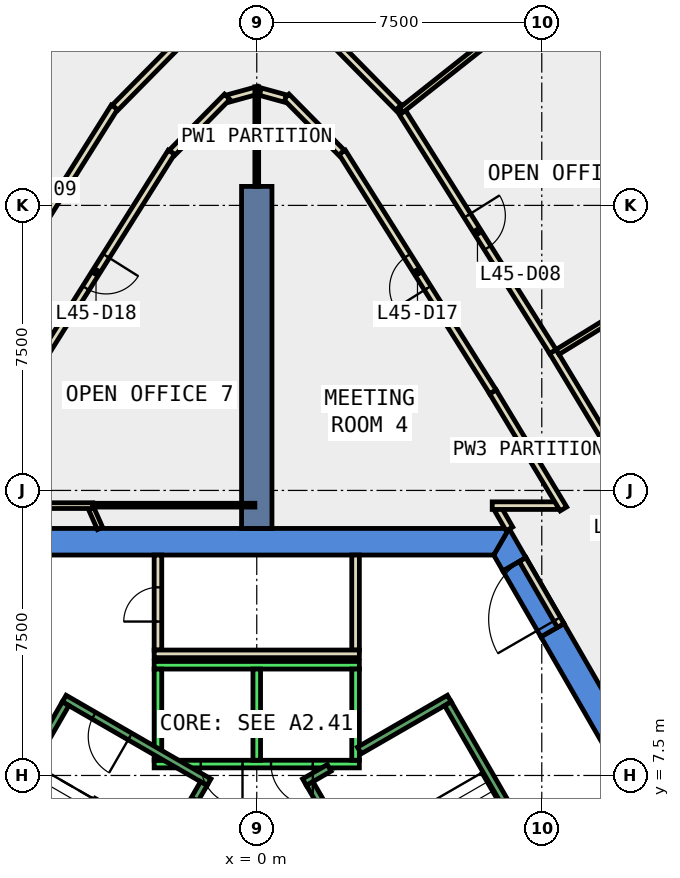
"""IFC4 building model, lengths in metres.
Left out: names, types, materials, properties, quantities, classifications, styles, units other than length and angle.
Written with IfcOpenShell. Run it as: python <this file> out.ifc"""

import sys

from ifc_helpers import new_model, si_unit, direction, frame, frame_2d, origin, place, context, subcontext, project, spatial, polyline, rectangle, outline, extrude, element, fill, save


model = new_model("IFC4")
c1 = context("Model", 3, precision=1e-05, world=origin(), true_north=direction((0.0, 1.0)))
c2 = subcontext(c1, "Body", "Model", "MODEL_VIEW")
j1 = project(units=[si_unit("LENGTHUNIT", "METRE"), si_unit("PLANEANGLEUNIT", "RADIAN")], contexts=[c1])
p1 = place(None, origin())
s1 = spatial("IfcSite", under=j1, at=p1, CompositionType="ELEMENT")
p2 = place(p1, origin())
s2 = spatial("IfcBuilding", under=s1, at=p2, CompositionType="ELEMENT")
p3 = place(p2, frame((0.0, 0.0, 202.4)))
s3 = spatial("IfcBuildingStorey", under=s2, at=p3, CompositionType="ELEMENT", Elevation=202.4)
p4 = place(p3, frame((0.0, 0.0, -0.4)))
e1 = element("IfcWall", 1, at=p4, inside=s3, PredefinedType="SHEAR", context=c2, shape_type="SweptSolid", body=[
    extrude(outline(polyline([(8.084, 11.498), (7.478, 11.148), (12.471, 2.5), (13.279, 2.5), (8.084, 11.498)])), origin(), (0.0, 0.0, 1.0), 4.2),
])
p5 = place(p3, frame((0.0, 0.0, -0.4)))
e2 = element("IfcWall", 2, at=p5, inside=s3, PredefinedType="SHEAR", context=c2, shape_type="SweptSolid", body=[
    extrude(outline(polyline([(6.478, 12.88), (7.084, 13.23), (6.64, 14.0), (6.235, 13.3), (6.478, 12.88)])), origin(), (0.0, 0.0, 1.0), 4.2),
])
p6 = place(p3, frame((0.0, 0.0, 3.6)))
e3 = element("IfcWall", 3, at=p6, inside=s3, PredefinedType="SHEAR", context=c2, shape_type="SweptSolid", body=[
    extrude(outline(polyline([(7.084, 13.23), (6.478, 12.88), (7.478, 11.148), (8.084, 11.498), (7.084, 13.23)])), origin(), (0.0, 0.0, 1.0), 0.2),
])
p7 = place(p3, frame((0.0, 0.0, -0.4)))
e4 = element("IfcWall", 4, at=p7, inside=s3, PredefinedType="SHEAR", context=c2, shape_type="SweptSolid", body=[
    extrude(outline(polyline([(6.64, 14.0), (-6.64, 14.0), (-6.235, 13.3), (6.235, 13.3), (6.64, 14.0)])), origin(), (0.0, 0.0, 1.0), 4.2),
])
p8 = place(p3, frame((0.0, 14.0, -0.4), z_axis=(0.0, 0.0, 1.0), x_axis=(0.0, 1.0, 0.0)))
e5 = element("IfcWall", 5, at=p8, inside=s3, PredefinedType="SHEAR", context=c2, shape_type="SweptSolid", body=[
    extrude(rectangle(XDim=9.0, YDim=0.8, at=frame_2d((4.5, 0.0))), origin(), (0.0, 0.0, 1.0), 4.2),
])
p9 = place(p3, frame((12.632, 22.134, 0.0), z_axis=(0.0, 0.0, 1.0), x_axis=(-0.532522107002, 0.84641609481, 0.0)))
e6 = element("IfcWall", 6, at=p9, inside=s3, PredefinedType="STANDARD", context=c2, shape_type="SweptSolid", body=[
    extrude(rectangle(XDim=7.273, YDim=0.3, at=frame_2d((3.636, 0.0))), origin(), (0.0, 0.0, 1.0), 3.8),
])
p10 = place(p9, frame((0.618, 0.0, 0.9)))
e7 = element("IfcOpeningElement", 7, at=p10, cuts=e6, PredefinedType="OPENING", context=c2, shape_type="SweptSolid", body=[
    extrude(rectangle(XDim=2.4, YDim=2.6, at=frame_2d((1.2, 1.3))), frame((0.0, 0.16, 0.0), z_axis=(0.0, -1.0, 0.0), x_axis=(1.0, 0.0, 0.0)), (0.0, 0.0, 1.0), 0.32),
])
p11 = place(p9, frame((4.255, 0.0, 0.9)))
e8 = element("IfcOpeningElement", 8, at=p11, cuts=e6, PredefinedType="OPENING", context=c2, shape_type="SweptSolid", body=[
    extrude(rectangle(XDim=2.4, YDim=2.6, at=frame_2d((1.2, 1.3))), frame((0.0, 0.16, 0.0), z_axis=(0.0, -1.0, 0.0), x_axis=(1.0, 0.0, 0.0)), (0.0, 0.0, 1.0), 0.32),
])
p12 = place(p3, frame((6.649, 13.988, 0.0), z_axis=(0.0, 0.0, 1.0), x_axis=(-0.499908430952, 0.866078264744, 0.0)))
e9 = element("IfcWall", 9, at=p12, inside=s3, PredefinedType="PARTITIONING", context=c2, shape_type="SweptSolid", body=[
    extrude(rectangle(XDim=0.606, YDim=0.2, at=frame_2d((0.303, 0.0))), origin(), (0.0, 0.0, 1.0), 3.8),
])
p13 = place(p3, frame((6.196, 14.6, 0.0), z_axis=(0.0, 0.0, 1.0), x_axis=(1.0, 0.0, 0.0)))
e10 = element("IfcWall", 10, at=p13, inside=s3, PredefinedType="PARTITIONING", context=c2, shape_type="SweptSolid", body=[
    extrude(rectangle(XDim=1.722, YDim=0.2, at=frame_2d((0.861, 0.0))), origin(), (0.0, 0.0, 1.0), 3.8),
])
p14 = place(p3, frame((8.07, 14.514, 0.0), z_axis=(0.0, 0.0, 1.0), x_axis=(-0.51624118739, 0.856443247648, 0.0)))
e11 = element("IfcWall", 11, at=p14, inside=s3, PredefinedType="PARTITIONING", context=c2, shape_type="SweptSolid", body=[
    extrude(rectangle(XDim=3.597, YDim=0.2, at=frame_2d((1.799, 0.0))), origin(), (0.0, 0.0, 1.0), 3.8),
])
p15 = place(p3, frame((6.213, 17.595, 0.0), z_axis=(0.0, 0.0, 1.0), x_axis=(-0.532527247309, 0.846412860768, 0.0)))
e12 = element("IfcWall", 12, at=p15, inside=s3, PredefinedType="PARTITIONING", context=c2, shape_type="SweptSolid", body=[
    extrude(rectangle(XDim=7.449, YDim=0.2, at=frame_2d((3.725, 0.0))), origin(), (0.0, 0.0, 1.0), 3.8),
])
p16 = place(p15, frame((3.225, 0.0, 0.0)))
e13 = element("IfcOpeningElement", 13, at=p16, cuts=e12, PredefinedType="OPENING", context=c2, shape_type="SweptSolid", body=[
    extrude(rectangle(XDim=1.0, YDim=2.1, at=frame_2d((0.5, 1.05))), frame((0.0, 0.11, 0.0), z_axis=(0.0, -1.0, 0.0), x_axis=(1.0, 0.0, 0.0)), (0.0, 0.0, 1.0), 0.22),
])
p17 = place(p3, frame((2.229, 23.887, 0.0), z_axis=(0.0, 0.0, 1.0), x_axis=(-0.702245482258, 0.711934886523, 0.0)))
e14 = element("IfcWall", 14, at=p17, inside=s3, PredefinedType="PARTITIONING", context=c2, shape_type="SweptSolid", body=[
    extrude(rectangle(XDim=2.066, YDim=0.2, at=frame_2d((1.033, 0.0))), origin(), (0.0, 0.0, 1.0), 3.8),
])
p18 = place(p3, frame((0.752, 25.313, 0.0), z_axis=(0.0, 0.0, 1.0), x_axis=(-0.964381816756, 0.264514104559, 0.0)))
e15 = element("IfcWall", 15, at=p18, inside=s3, PredefinedType="PARTITIONING", context=c2, shape_type="SweptSolid", body=[
    extrude(rectangle(XDim=0.68, YDim=0.2, at=frame_2d((0.34, 0.0))), origin(), (0.0, 0.0, 1.0), 3.8),
])
p19 = place(p3, frame((0.048, 25.533, 0.0), z_axis=(0.0, 0.0, 1.0), x_axis=(-0.964218556253, -0.265108611286, 0.0)))
e16 = element("IfcWall", 16, at=p19, inside=s3, PredefinedType="PARTITIONING", context=c2, shape_type="SweptSolid", body=[
    extrude(rectangle(XDim=0.83, YDim=0.2, at=frame_2d((0.415, 0.0))), origin(), (0.0, 0.0, 1.0), 3.8),
])
p20 = place(p3, frame((-0.778, 25.358, 0.0), z_axis=(0.0, 0.0, 1.0), x_axis=(-0.702245482258, -0.711934886523, 0.0)))
e17 = element("IfcWall", 17, at=p20, inside=s3, PredefinedType="PARTITIONING", context=c2, shape_type="SweptSolid", body=[
    extrude(rectangle(XDim=2.066, YDim=0.2, at=frame_2d((1.033, 0.0))), origin(), (0.0, 0.0, 1.0), 3.8),
])
p21 = place(p3, frame((-2.246, 23.9, 0.0), z_axis=(0.0, 0.0, 1.0), x_axis=(-0.532527247309, -0.846412860768, 0.0)))
e18 = element("IfcWall", 18, at=p21, inside=s3, PredefinedType="PARTITIONING", context=c2, shape_type="SweptSolid", body=[
    extrude(rectangle(XDim=7.449, YDim=0.2, at=frame_2d((3.725, 0.0))), origin(), (0.0, 0.0, 1.0), 3.8),
])
p22 = place(p21, frame((3.225, 0.0, 0.0)))
e19 = element("IfcOpeningElement", 19, at=p22, cuts=e18, PredefinedType="OPENING", context=c2, shape_type="SweptSolid", body=[
    extrude(rectangle(XDim=1.0, YDim=2.1, at=frame_2d((0.5, 1.05))), frame((0.0, 0.11, 0.0), z_axis=(0.0, -1.0, 0.0), x_axis=(1.0, 0.0, 0.0)), (0.0, 0.0, 1.0), 0.22),
])
p23 = place(p3, frame((7.792, 18.655, 0.0), z_axis=(0.0, 0.0, 1.0), x_axis=(0.516293428925, -0.856411755669, 0.0)))
e20 = element("IfcWall", 20, at=p23, inside=s3, PredefinedType="PARTITIONING", context=c2, shape_type="SweptSolid", body=[
    extrude(rectangle(XDim=8.124, YDim=0.2, at=frame_2d((4.062, 0.0))), origin(), (0.0, 0.0, 1.0), 3.8),
])
p24 = place(p23, frame((3.637, 0.0, 0.0)))
e21 = element("IfcOpeningElement", 21, at=p24, cuts=e20, PredefinedType="OPENING", context=c2, shape_type="SweptSolid", body=[
    extrude(rectangle(XDim=1.0, YDim=2.1, at=frame_2d((0.5, 1.05))), frame((0.0, 0.11, 0.0), z_axis=(0.0, -1.0, 0.0), x_axis=(1.0, 0.0, 0.0)), (0.0, 0.0, 1.0), 0.22),
])
p25 = place(p3, frame((3.744, 25.087, 0.0), z_axis=(0.0, 0.0, 1.0), x_axis=(0.532569549341, -0.846386244639, 0.0)))
e22 = element("IfcWall", 22, at=p25, inside=s3, PredefinedType="PARTITIONING", context=c2, shape_type="SweptSolid", body=[
    extrude(rectangle(XDim=7.599, YDim=0.2, at=frame_2d((3.8, 0.0))), origin(), (0.0, 0.0, 1.0), 3.8),
])
p26 = place(p25, frame((3.375, 0.0, 0.0)))
e23 = element("IfcOpeningElement", 23, at=p26, cuts=e22, PredefinedType="OPENING", context=c2, shape_type="SweptSolid", body=[
    extrude(rectangle(XDim=1.0, YDim=2.1, at=frame_2d((0.5, 1.05))), frame((0.0, 0.11, 0.0), z_axis=(0.0, -1.0, 0.0), x_axis=(1.0, 0.0, 0.0)), (0.0, 0.0, 1.0), 0.22),
])
p27 = place(p3, frame((-7.871, 18.528, 0.0), z_axis=(0.0, 0.0, 1.0), x_axis=(0.532587642146, 0.846374859878, 0.0)))
e24 = element("IfcWall", 24, at=p27, inside=s3, PredefinedType="PARTITIONING", context=c2, shape_type="SweptSolid", body=[
    extrude(rectangle(XDim=7.749, YDim=0.2, at=frame_2d((3.875, 0.0))), origin(), (0.0, 0.0, 1.0), 3.8),
])
p28 = place(p27, frame((3.375, 0.0, 0.0)))
e25 = element("IfcOpeningElement", 25, at=p28, cuts=e24, PredefinedType="OPENING", context=c2, shape_type="SweptSolid", body=[
    extrude(rectangle(XDim=1.0, YDim=2.1, at=frame_2d((0.5, 1.05))), frame((0.0, 0.11, 0.0), z_axis=(0.0, -1.0, 0.0), x_axis=(1.0, 0.0, 0.0)), (0.0, 0.0, 1.0), 0.22),
])
for number, where, z_axis, x_axis in (
    (26, (-3.727, 25.074, 0.0), (0.0, 0.0, 1.0), (0.702, 0.712, 0.0)),
    (27, (1.773, 27.056, 0.0), (0.0, 0.0, 1.0), (0.702, -0.712, 0.0)),
):
    element("IfcWall", number, at=place(p3, frame(where, z_axis=z_axis, x_axis=x_axis)), inside=s3, PredefinedType="PARTITIONING", context=c2, shape_type="SweptSolid", body=[
        extrude(rectangle(XDim=2.783, YDim=0.2, at=frame_2d((1.392, 0.0))), origin(), (0.0, 0.0, 1.0), 3.8),
    ])
p29 = place(p3, frame((-2.6, 10.8, 0.0), z_axis=(0.0, 0.0, 1.0), x_axis=(0.0, 1.0, 0.0)))
e28 = element("IfcWall", 28, at=p29, inside=s3, PredefinedType="PARTITIONING", context=c2, shape_type="SweptSolid", body=[
    extrude(rectangle(XDim=2.5, YDim=0.2, at=frame_2d((1.25, 0.0))), origin(), (0.0, 0.0, 1.0), 3.8),
])
p30 = place(p29, frame((0.75, 0.0, 0.0)))
e29 = element("IfcOpeningElement", 29, at=p30, cuts=e28, PredefinedType="OPENING", context=c2, shape_type="SweptSolid", body=[
    extrude(rectangle(XDim=0.9, YDim=2.1, at=frame_2d((0.45, 1.05))), frame((0.0, 0.11, 0.0), z_axis=(0.0, -1.0, 0.0), x_axis=(1.0, 0.0, 0.0)), (0.0, 0.0, 1.0), 0.22),
])
p31 = place(p3, frame((2.6, 13.3, 0.0), z_axis=(0.0, 0.0, 1.0), x_axis=(0.0, -1.0, 0.0)))
e30 = element("IfcWall", 30, at=p31, inside=s3, PredefinedType="PARTITIONING", context=c2, shape_type="SweptSolid", body=[
    extrude(rectangle(XDim=2.5, YDim=0.2, at=frame_2d((1.25, 0.0))), origin(), (0.0, 0.0, 1.0), 3.8),
])
p32 = place(p3, frame((2.7, 10.7, 0.0), z_axis=(0.0, 0.0, 1.0), x_axis=(-1.0, 0.0, 0.0)))
e31 = element("IfcWall", 31, at=p32, inside=s3, PredefinedType="PARTITIONING", context=c2, shape_type="SweptSolid", body=[
    extrude(rectangle(XDim=5.4, YDim=0.2, at=frame_2d((2.7, 0.0))), origin(), (0.0, 0.0, 1.0), 3.8),
])
p33 = place(p3, frame((-4.125, 14.0, 0.0), z_axis=(0.0, 0.0, 1.0), x_axis=(-0.404850841056, 0.914382740703, 0.0)))
e32 = element("IfcWall", 32, at=p33, inside=s3, PredefinedType="PARTITIONING", context=c2, shape_type="SweptSolid", body=[
    extrude(rectangle(XDim=0.581, YDim=0.15, at=frame_2d((0.291, 0.0))), origin(), (0.0, 0.0, 1.0), 3.8),
])
p34 = place(p3, frame((-4.316, 14.6, 0.0), z_axis=(0.0, 0.0, 1.0), x_axis=(-1.0, 0.0, 0.0)))
e33 = element("IfcWall", 33, at=p34, inside=s3, PredefinedType="PARTITIONING", context=c2, shape_type="SweptSolid", body=[
    extrude(rectangle(XDim=3.802, YDim=0.15, at=frame_2d((1.901, 0.0))), origin(), (0.0, 0.0, 1.0), 3.8),
])
p35 = place(p3, frame((-4.316, 14.612, 0.0), z_axis=(0.0, 0.0, 1.0), x_axis=(1.0, 0.0, 0.0)))
e34 = element("IfcWall", 34, at=p35, inside=s3, PredefinedType="PARTITIONING", context=c2, shape_type="SweptSolid", body=[
    extrude(rectangle(XDim=4.266, YDim=0.1, at=frame_2d((2.133, 0.0))), origin(), (0.0, 0.0, 1.0), 3.8),
])
p36 = place(p3, frame((0.0, 23.0, 0.0), z_axis=(0.0, 0.0, 1.0), x_axis=(0.0, 1.0, 0.0)))
e35 = element("IfcWall", 35, at=p36, inside=s3, PredefinedType="PARTITIONING", context=c2, shape_type="SweptSolid", body=[
    extrude(rectangle(XDim=2.62, YDim=0.1, at=frame_2d((1.31, 0.0))), origin(), (0.0, 0.0, 1.0), 3.8),
])
p37 = place(p3, frame((7.916, 18.644, 0.0), z_axis=(0.0, 0.0, 1.0), x_axis=(0.851543444049, 0.524284047914, 0.0)))
e36 = element("IfcWall", 36, at=p37, inside=s3, PredefinedType="PARTITIONING", context=c2, shape_type="SweptSolid", body=[
    extrude(rectangle(XDim=4.379, YDim=0.15, at=frame_2d((2.189, 0.0))), origin(), (0.0, 0.0, 1.0), 3.8),
])
p38 = place(p3, frame((3.797, 25.003, 0.0), z_axis=(0.0, 0.0, 1.0), x_axis=(0.783893371826, 0.620895467536, 0.0)))
e37 = element("IfcWall", 37, at=p38, inside=s3, PredefinedType="PARTITIONING", context=c2, shape_type="SweptSolid", body=[
    extrude(rectangle(XDim=4.514, YDim=0.15, at=frame_2d((2.257, 0.0))), origin(), (0.0, 0.0, 1.0), 3.8),
])
p39 = place(p3, frame((7.997, 11.448, 0.0), z_axis=(0.0, 0.0, 1.0), x_axis=(-0.50002537861, 0.866010750942, 0.0)))
e38 = element("IfcWall", 38, at=p39, inside=s3, PredefinedType="PARTITIONING", context=c2, shape_type="SweptSolid", body=[
    extrude(rectangle(XDim=2.0, YDim=0.2, at=frame_2d((1.0, 0.0))), origin(), (0.0, 0.0, 1.0), 2.4),
])
p40 = place(p39, frame((0.19, 0.0, 0.0)))
e39 = element("IfcOpeningElement", 39, at=p40, cuts=e38, PredefinedType="OPENING", context=c2, shape_type="SweptSolid", body=[
    extrude(rectangle(XDim=1.8, YDim=2.1, at=frame_2d((0.9, 1.05))), frame((0.0, 0.11, 0.0), z_axis=(0.0, -1.0, 0.0), x_axis=(1.0, 0.0, 0.0)), (0.0, 0.0, 1.0), 0.22),
])
p41 = place(p3, frame((2.7, 7.8, 0.0), z_axis=(0.0, 0.0, 1.0), x_axis=(-1.0, 0.0, 0.0)))
e40 = element("IfcWall", 40, at=p41, inside=s3, PredefinedType="STANDARD", context=c2, shape_type="SweptSolid", body=[
    extrude(rectangle(XDim=5.4, YDim=0.2, at=frame_2d((2.7, 0.0))), origin(), (0.0, 0.0, 1.0), 3.8),
])
p42 = place(p41, frame((1.225, 0.0, 0.0)))
e41 = element("IfcOpeningElement", 41, at=p42, cuts=e40, PredefinedType="OPENING", context=c2, shape_type="SweptSolid", body=[
    extrude(rectangle(XDim=1.1, YDim=2.1, at=frame_2d((0.55, 1.05))), frame((0.0, 0.11, 0.0), z_axis=(0.0, -1.0, 0.0), x_axis=(1.0, 0.0, 0.0)), (0.0, 0.0, 1.0), 0.22),
])
p43 = place(p41, frame((3.075, 0.0, 0.0)))
e42 = element("IfcOpeningElement", 42, at=p43, cuts=e40, PredefinedType="OPENING", context=c2, shape_type="SweptSolid", body=[
    extrude(rectangle(XDim=1.1, YDim=2.1, at=frame_2d((0.55, 1.05))), frame((0.0, 0.11, 0.0), z_axis=(0.0, -1.0, 0.0), x_axis=(1.0, 0.0, 0.0)), (0.0, 0.0, 1.0), 0.22),
])
p44 = place(p3, frame((2.7, 10.4, 0.0), z_axis=(0.0, 0.0, 1.0), x_axis=(-1.0, 0.0, 0.0)))
e43 = element("IfcWall", 43, at=p44, inside=s3, PredefinedType="STANDARD", context=c2, shape_type="SweptSolid", body=[
    extrude(rectangle(XDim=5.4, YDim=0.2, at=frame_2d((2.7, 0.0))), origin(), (0.0, 0.0, 1.0), 3.8),
])
for number, where, z_axis, x_axis in (
    (44, (2.6, 7.9, 0.0), (0.0, 0.0, 1.0), (0.0, 1.0, 0.0)),
    (45, (0.0, 7.9, 0.0), (0.0, 0.0, 1.0), (0.0, 1.0, 0.0)),
    (46, (-2.6, 7.9, 0.0), (0.0, 0.0, 1.0), (0.0, 1.0, 0.0)),
):
    element("IfcWall", number, at=place(p3, frame(where, z_axis=z_axis, x_axis=x_axis)), inside=s3, PredefinedType="STANDARD", context=c2, shape_type="SweptSolid", body=[
        extrude(rectangle(XDim=2.4, YDim=0.2, at=frame_2d((1.2, 0.0))), origin(), (0.0, 0.0, 1.0), 3.8),
    ])
p45 = place(p3, frame((2.7, 8.158, 0.0), z_axis=(0.0, 0.0, 1.0), x_axis=(0.86611865017, 0.499838457731, 0.0)))
e47 = element("IfcWall", 47, at=p45, inside=s3, PredefinedType="STANDARD", context=c2, shape_type="SweptSolid", body=[
    extrude(rectangle(XDim=2.733, YDim=0.2, at=frame_2d((1.366, 0.0))), origin(), (0.0, 0.0, 1.0), 3.8),
])
p46 = place(p3, frame((1.256, 7.324, 0.0), z_axis=(0.0, 0.0, 1.0), x_axis=(0.865915093549, 0.500191014278, 0.0)))
e48 = element("IfcWall", 48, at=p46, inside=s3, PredefinedType="STANDARD", context=c2, shape_type="SweptSolid", body=[
    extrude(rectangle(XDim=0.752, YDim=0.2, at=frame_2d((0.376, 0.0))), origin(), (0.0, 0.0, 1.0), 3.8),
])
p47 = place(p3, frame((4.843, 1.312, 0.0), z_axis=(0.0, 0.0, 1.0), x_axis=(-0.499963383562, 0.866046543262, 0.0)))
e49 = element("IfcWall", 49, at=p47, inside=s3, PredefinedType="STANDARD", context=c2, shape_type="SweptSolid", body=[
    extrude(rectangle(XDim=6.9, YDim=0.2, at=frame_2d((3.45, 0.0))), origin(), (0.0, 0.0, 1.0), 3.8),
])
p48 = place(p47, frame((0.45, 0.0, 0.0)))
e50 = element("IfcOpeningElement", 50, at=p48, cuts=e49, PredefinedType="OPENING", context=c2, shape_type="SweptSolid", body=[
    extrude(rectangle(XDim=1.1, YDim=2.2, at=frame_2d((0.55, 1.1))), frame((0.0, 0.11, 0.0), z_axis=(0.0, -1.0, 0.0), x_axis=(1.0, 0.0, 0.0)), (0.0, 0.0, 1.0), 0.22),
])
p49 = place(p3, frame((8.48, 3.412, 0.0), z_axis=(0.0, 0.0, 1.0), x_axis=(-0.499978703459, 0.866037698999, 0.0)))
e51 = element("IfcWall", 51, at=p49, inside=s3, PredefinedType="STANDARD", context=c2, shape_type="SweptSolid", body=[
    extrude(rectangle(XDim=6.9, YDim=0.2, at=frame_2d((3.45, 0.0))), origin(), (0.0, 0.0, 1.0), 3.8),
])
p50 = place(p3, frame((-1.256, 7.324, 0.0), z_axis=(0.0, 0.0, 1.0), x_axis=(-0.866046073146, 0.499964197906, 0.0)))
e52 = element("IfcWall", 52, at=p50, inside=s3, PredefinedType="STANDARD", context=c2, shape_type="SweptSolid", body=[
    extrude(rectangle(XDim=4.4, YDim=0.2, at=frame_2d((2.2, 0.0))), origin(), (0.0, 0.0, 1.0), 3.8),
])
p51 = place(p50, frame((2.4, 0.0, 0.0)))
e53 = element("IfcOpeningElement", 53, at=p51, cuts=e52, PredefinedType="OPENING", context=c2, shape_type="SweptSolid", body=[
    extrude(rectangle(XDim=1.1, YDim=2.2, at=frame_2d((0.55, 1.1))), frame((0.0, 0.11, 0.0), z_axis=(0.0, -1.0, 0.0), x_axis=(1.0, 0.0, 0.0)), (0.0, 0.0, 1.0), 0.22),
])
p52 = place(p3, frame((-1.393, 7.288, 0.0), z_axis=(0.0, 0.0, 1.0), x_axis=(-0.499963383562, -0.866046543262, 0.0)))
e54 = element("IfcWall", 54, at=p52, inside=s3, PredefinedType="STANDARD", context=c2, shape_type="SweptSolid", body=[
    extrude(rectangle(XDim=6.9, YDim=0.2, at=frame_2d((3.45, 0.0))), origin(), (0.0, 0.0, 1.0), 3.8),
])
p53 = place(p52, frame((0.45, 0.0, 0.0)))
e55 = element("IfcOpeningElement", 55, at=p53, cuts=e54, PredefinedType="OPENING", context=c2, shape_type="SweptSolid", body=[
    extrude(rectangle(XDim=1.1, YDim=2.2, at=frame_2d((0.55, 1.1))), frame((0.0, 0.11, 0.0), z_axis=(0.0, -1.0, 0.0), x_axis=(1.0, 0.0, 0.0)), (0.0, 0.0, 1.0), 0.22),
])
p54 = place(p3, frame((-5.03, 9.388, 0.0), z_axis=(0.0, 0.0, 1.0), x_axis=(-0.499978703459, -0.866037698999, 0.0)))
e56 = element("IfcWall", 56, at=p54, inside=s3, PredefinedType="STANDARD", context=c2, shape_type="SweptSolid", body=[
    extrude(rectangle(XDim=6.9, YDim=0.2, at=frame_2d((3.45, 0.0))), origin(), (0.0, 0.0, 1.0), 3.8),
])
p55 = place(p26, origin())
e57 = element("IfcDoor", 57, at=p55, inside=s3, OperationType="SINGLE_SWING_LEFT", PredefinedType="DOOR", context=c2, shape_type="SweptSolid", body=[
    extrude(rectangle(XDim=1.0, YDim=2.1, at=frame_2d((0.5, 1.05))), frame((0.0, 0.025, 0.0), z_axis=(0.0, -1.0, 0.0), x_axis=(1.0, 0.0, 0.0)), (0.0, 0.0, 1.0), 0.05),
])
fill(e23, e57)
p56 = place(p16, origin())
e58 = element("IfcDoor", 58, at=p56, inside=s3, OperationType="SINGLE_SWING_LEFT", PredefinedType="DOOR", context=c2, shape_type="SweptSolid", body=[
    extrude(rectangle(XDim=1.0, YDim=2.1, at=frame_2d((0.5, 1.05))), frame((0.0, 0.025, 0.0), z_axis=(0.0, -1.0, 0.0), x_axis=(1.0, 0.0, 0.0)), (0.0, 0.0, 1.0), 0.05),
])
fill(e13, e58)
p57 = place(p22, origin())
e59 = element("IfcDoor", 59, at=p57, inside=s3, OperationType="SINGLE_SWING_LEFT", PredefinedType="DOOR", context=c2, shape_type="SweptSolid", body=[
    extrude(rectangle(XDim=1.0, YDim=2.1, at=frame_2d((0.5, 1.05))), frame((0.0, 0.025, 0.0), z_axis=(0.0, -1.0, 0.0), x_axis=(1.0, 0.0, 0.0)), (0.0, 0.0, 1.0), 0.05),
])
fill(e19, e59)
p58 = place(p30, origin())
e60 = element("IfcDoor", 60, at=p58, inside=s3, OperationType="SINGLE_SWING_RIGHT", PredefinedType="DOOR", context=c2, shape_type="SweptSolid", body=[
    extrude(rectangle(XDim=0.9, YDim=2.1, at=frame_2d((0.45, 1.05))), frame((0.0, 0.025, 0.0), z_axis=(0.0, -1.0, 0.0), x_axis=(1.0, 0.0, 0.0)), (0.0, 0.0, 1.0), 0.05),
])
fill(e29, e60)
p59 = place(p40, origin())
e61 = element("IfcDoor", 61, at=p59, inside=s3, OperationType="DOUBLE_DOOR_SINGLE_SWING", PredefinedType="DOOR", context=c2, shape_type="SweptSolid", body=[
    extrude(rectangle(XDim=1.8, YDim=2.1, at=frame_2d((0.9, 1.05))), frame((0.0, 0.025, 0.0), z_axis=(0.0, -1.0, 0.0), x_axis=(1.0, 0.0, 0.0)), (0.0, 0.0, 1.0), 0.05),
])
fill(e39, e61)
p60 = place(p42, origin())
e62 = element("IfcDoor", 62, at=p60, inside=s3, OperationType="SLIDING_TO_LEFT", PredefinedType="DOOR", context=c2, shape_type="SweptSolid", body=[
    extrude(rectangle(XDim=1.1, YDim=2.1, at=frame_2d((0.55, 1.05))), frame((0.0, 0.025, 0.0), z_axis=(0.0, -1.0, 0.0), x_axis=(1.0, 0.0, 0.0)), (0.0, 0.0, 1.0), 0.05),
])
fill(e41, e62)
p61 = place(p43, origin())
e63 = element("IfcDoor", 63, at=p61, inside=s3, OperationType="SLIDING_TO_LEFT", PredefinedType="DOOR", context=c2, shape_type="SweptSolid", body=[
    extrude(rectangle(XDim=1.1, YDim=2.1, at=frame_2d((0.55, 1.05))), frame((0.0, 0.025, 0.0), z_axis=(0.0, -1.0, 0.0), x_axis=(1.0, 0.0, 0.0)), (0.0, 0.0, 1.0), 0.05),
])
fill(e42, e63)
p62 = place(p53, origin())
e64 = element("IfcDoor", 64, at=p62, inside=s3, OperationType="SINGLE_SWING_LEFT", PredefinedType="DOOR", context=c2, shape_type="SweptSolid", body=[
    extrude(rectangle(XDim=1.1, YDim=2.2, at=frame_2d((0.55, 1.1))), frame((0.0, 0.025, 0.0), z_axis=(0.0, -1.0, 0.0), x_axis=(1.0, 0.0, 0.0)), (0.0, 0.0, 1.0), 0.05),
])
fill(e55, e64)
p63 = place(p51, origin())
e65 = element("IfcDoor", 65, at=p63, inside=s3, OperationType="SINGLE_SWING_LEFT", PredefinedType="DOOR", context=c2, shape_type="SweptSolid", body=[
    extrude(rectangle(XDim=1.1, YDim=2.2, at=frame_2d((0.55, 1.1))), frame((0.0, 0.025, 0.0), z_axis=(0.0, -1.0, 0.0), x_axis=(1.0, 0.0, 0.0)), (0.0, 0.0, 1.0), 0.05),
])
fill(e53, e65)
save(model, sys.argv[1])
